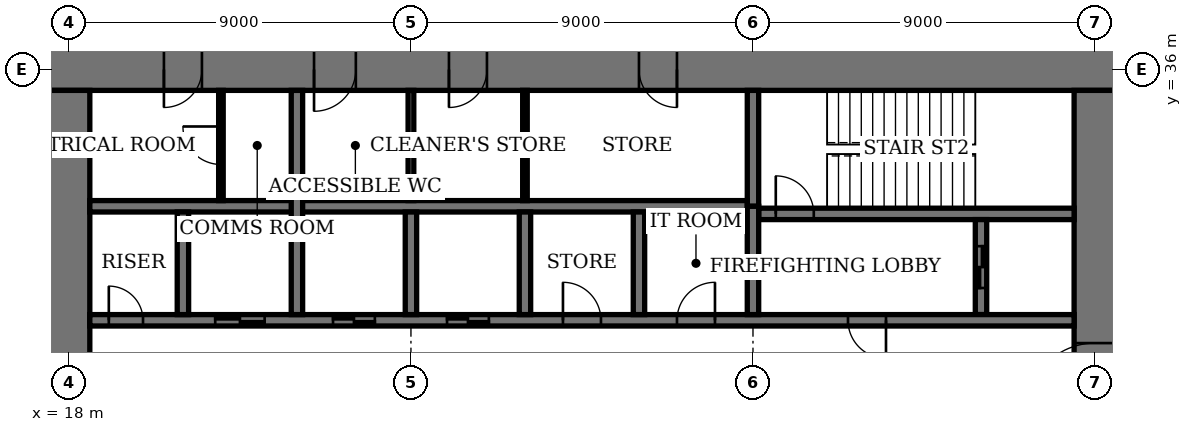
"""IFC4 building model, lengths in metres.
Left out: names, types, materials, properties, quantities, classifications, styles, units other than length and angle.
Written with IfcOpenShell. Run it as: python <this file> out.ifc"""

import sys

from ifc_helpers import new_model, si_unit, direction, frame, frame_2d, origin, place, context, subcontext, project, spatial, rectangle, extrude, element, fill, save


model = new_model("IFC4")
c1 = context("Model", 3, precision=1e-05, world=origin(), true_north=direction((0.0, 1.0)))
c2 = subcontext(c1, "Body", "Model", "MODEL_VIEW")
j1 = project(units=[si_unit("LENGTHUNIT", "METRE"), si_unit("PLANEANGLEUNIT", "RADIAN")], contexts=[c1])
p1 = place(None, origin())
s1 = spatial("IfcSite", under=j1, at=p1, CompositionType="ELEMENT")
p2 = place(p1, origin())
s2 = spatial("IfcBuilding", under=s1, at=p2, CompositionType="ELEMENT")
p3 = place(p2, frame((0.0, 0.0, 210.2)))
s3 = spatial("IfcBuildingStorey", under=s2, at=p3, CompositionType="ELEMENT", Elevation=210.2)
p4 = place(p3, frame((45.55, 36.0, 0.0), z_axis=(0.0, 0.0, 1.0), x_axis=(-1.0, 0.0, 0.0)))
e1 = element("IfcWall", 1, at=p4, inside=s3, PredefinedType="SHEAR", context=c2, shape_type="SweptSolid", body=[
    extrude(rectangle(XDim=28.1, YDim=1.1, at=frame_2d((14.05, 0.0))), origin(), (0.0, 0.0, 1.0), 4.0),
])
p5 = place(p4, frame((11.55, 0.0, 0.0)))
e2 = element("IfcOpeningElement", 2, at=p5, cuts=e1, PredefinedType="OPENING", context=c2, shape_type="SweptSolid", body=[
    extrude(rectangle(XDim=1.0, YDim=2.4, at=frame_2d((0.5, 1.2))), frame((0.0, 0.56, 0.0), z_axis=(0.0, -1.0, 0.0), x_axis=(1.0, 0.0, 0.0)), (0.0, 0.0, 1.0), 1.12),
])
p6 = place(p4, frame((16.55, 0.0, 0.0)))
e3 = element("IfcOpeningElement", 3, at=p6, cuts=e1, PredefinedType="OPENING", context=c2, shape_type="SweptSolid", body=[
    extrude(rectangle(XDim=1.0, YDim=2.4, at=frame_2d((0.5, 1.2))), frame((0.0, 0.56, 0.0), z_axis=(0.0, -1.0, 0.0), x_axis=(1.0, 0.0, 0.0)), (0.0, 0.0, 1.0), 1.12),
])
p7 = place(p4, frame((20.0, 0.0, 0.0)))
e4 = element("IfcOpeningElement", 4, at=p7, cuts=e1, PredefinedType="OPENING", context=c2, shape_type="SweptSolid", body=[
    extrude(rectangle(XDim=1.1, YDim=2.4, at=frame_2d((0.55, 1.2))), frame((0.0, 0.56, 0.0), z_axis=(0.0, -1.0, 0.0), x_axis=(1.0, 0.0, 0.0)), (0.0, 0.0, 1.0), 1.12),
])
p8 = place(p4, frame((24.05, 0.0, 0.0)))
e5 = element("IfcOpeningElement", 5, at=p8, cuts=e1, PredefinedType="OPENING", context=c2, shape_type="SweptSolid", body=[
    extrude(rectangle(XDim=1.0, YDim=2.4, at=frame_2d((0.5, 1.2))), frame((0.0, 0.56, 0.0), z_axis=(0.0, -1.0, 0.0), x_axis=(1.0, 0.0, 0.0)), (0.0, 0.0, 1.0), 1.12),
])
p9 = place(p3, frame((18.0, 35.45, 0.0), z_axis=(0.0, 0.0, 1.0), x_axis=(0.0, -1.0, 0.0)))
e6 = element("IfcWall", 6, at=p9, inside=s3, PredefinedType="SHEAR", context=c2, shape_type="SweptSolid", body=[
    extrude(rectangle(XDim=16.9, YDim=1.1, at=frame_2d((8.45, 0.0))), origin(), (0.0, 0.0, 1.0), 4.0),
])
p10 = place(p9, frame((8.45, 0.0, 0.0)))
e7 = element("IfcOpeningElement", 7, at=p10, cuts=e6, PredefinedType="OPENING", context=c2, shape_type="SweptSolid", body=[
    extrude(rectangle(XDim=1.8, YDim=2.4, at=frame_2d((0.9, 1.2))), frame((0.0, 0.56, 0.0), z_axis=(0.0, -1.0, 0.0), x_axis=(1.0, 0.0, 0.0)), (0.0, 0.0, 1.0), 1.12),
])
p11 = place(p3, frame((45.0, 18.55, 0.0), z_axis=(0.0, 0.0, 1.0), x_axis=(0.0, 1.0, 0.0)))
e8 = element("IfcWall", 8, at=p11, inside=s3, PredefinedType="SHEAR", context=c2, shape_type="SweptSolid", body=[
    extrude(rectangle(XDim=16.9, YDim=1.1, at=frame_2d((8.45, 0.0))), origin(), (0.0, 0.0, 1.0), 4.0),
])
p12 = place(p11, frame((8.45, 0.0, 0.0)))
e9 = element("IfcOpeningElement", 9, at=p12, cuts=e8, PredefinedType="OPENING", context=c2, shape_type="SweptSolid", body=[
    extrude(rectangle(XDim=1.8, YDim=2.4, at=frame_2d((0.9, 1.2))), frame((0.0, 0.56, 0.0), z_axis=(0.0, -1.0, 0.0), x_axis=(1.0, 0.0, 0.0)), (0.0, 0.0, 1.0), 1.12),
])
p13 = place(p3, frame((36.15, 32.2, 0.0), z_axis=(0.0, 0.0, 1.0), x_axis=(1.0, 0.0, 0.0)))
e10 = element("IfcWall", 10, at=p13, inside=s3, PredefinedType="SHEAR", context=c2, shape_type="SweptSolid", body=[
    extrude(rectangle(XDim=8.3, YDim=0.3, at=frame_2d((4.15, 0.0))), origin(), (0.0, 0.0, 1.0), 4.0),
])
p14 = place(p13, frame((0.45, 0.0, 0.0)))
e11 = element("IfcOpeningElement", 11, at=p14, cuts=e10, PredefinedType="OPENING", context=c2, shape_type="SweptSolid", body=[
    extrude(rectangle(XDim=1.0, YDim=2.4, at=frame_2d((0.5, 1.2))), frame((0.0, 0.16, 0.0), z_axis=(0.0, -1.0, 0.0), x_axis=(1.0, 0.0, 0.0)), (0.0, 0.0, 1.0), 0.32),
])
p15 = place(p3, frame((36.0, 32.4, 0.0), z_axis=(0.0, 0.0, 1.0), x_axis=(0.0, 1.0, 0.0)))
e12 = element("IfcWall", 12, at=p15, inside=s3, PredefinedType="SHEAR", context=c2, shape_type="SweptSolid", body=[
    extrude(rectangle(XDim=3.05, YDim=0.3, at=frame_2d((1.525, 0.0))), origin(), (0.0, 0.0, 1.0), 4.0),
])
p16 = place(p3, frame((42.0, 29.55, 0.0), z_axis=(0.0, 0.0, 1.0), x_axis=(0.0, 1.0, 0.0)))
e13 = element("IfcWall", 13, at=p16, inside=s3, PredefinedType="SHEAR", context=c2, shape_type="SweptSolid", body=[
    extrude(rectangle(XDim=2.5, YDim=0.3, at=frame_2d((1.25, 0.0))), origin(), (0.0, 0.0, 1.0), 4.0),
])
p17 = place(p16, frame((0.7, 0.0, 0.0)))
e14 = element("IfcOpeningElement", 14, at=p17, cuts=e13, PredefinedType="OPENING", context=c2, shape_type="SweptSolid", body=[
    extrude(rectangle(XDim=1.1, YDim=2.4, at=frame_2d((0.55, 1.2))), frame((0.0, 0.16, 0.0), z_axis=(0.0, -1.0, 0.0), x_axis=(1.0, 0.0, 0.0)), (0.0, 0.0, 1.0), 0.32),
])
p18 = place(p3, frame((18.55, 29.4, 0.0), z_axis=(0.0, 0.0, 1.0), x_axis=(1.0, 0.0, 0.0)))
e15 = element("IfcWall", 15, at=p18, inside=s3, PredefinedType="SHEAR", context=c2, shape_type="SweptSolid", body=[
    extrude(rectangle(XDim=25.9, YDim=0.3, at=frame_2d((12.95, 0.0))), origin(), (0.0, 0.0, 1.0), 4.0),
])
p19 = place(p18, frame((19.95, 0.0, 0.0)))
e16 = element("IfcOpeningElement", 16, at=p19, cuts=e15, PredefinedType="OPENING", context=c2, shape_type="SweptSolid", body=[
    extrude(rectangle(XDim=1.0, YDim=2.4, at=frame_2d((0.5, 1.2))), frame((0.0, 0.16, 0.0), z_axis=(0.0, -1.0, 0.0), x_axis=(1.0, 0.0, 0.0)), (0.0, 0.0, 1.0), 0.32),
])
p20 = place(p18, frame((0.5, 0.0, 0.0)))
e17 = element("IfcOpeningElement", 17, at=p20, cuts=e15, PredefinedType="OPENING", context=c2, shape_type="SweptSolid", body=[
    extrude(rectangle(XDim=0.9, YDim=2.1, at=frame_2d((0.45, 1.05))), frame((0.0, 0.16, 0.0), z_axis=(0.0, -1.0, 0.0), x_axis=(1.0, 0.0, 0.0)), (0.0, 0.0, 1.0), 0.32),
])
p21 = place(p18, frame((15.45, 0.0, 0.0)))
e18 = element("IfcOpeningElement", 18, at=p21, cuts=e15, PredefinedType="OPENING", context=c2, shape_type="SweptSolid", body=[
    extrude(rectangle(XDim=1.0, YDim=2.4, at=frame_2d((0.5, 1.2))), frame((0.0, 0.16, 0.0), z_axis=(0.0, -1.0, 0.0), x_axis=(1.0, 0.0, 0.0)), (0.0, 0.0, 1.0), 0.32),
])
p22 = place(p18, frame((12.45, 0.0, 0.0)))
e19 = element("IfcOpeningElement", 19, at=p22, cuts=e15, PredefinedType="OPENING", context=c2, shape_type="SweptSolid", body=[
    extrude(rectangle(XDim=1.0, YDim=2.4, at=frame_2d((0.5, 1.2))), frame((0.0, 0.16, 0.0), z_axis=(0.0, -1.0, 0.0), x_axis=(1.0, 0.0, 0.0)), (0.0, 0.0, 1.0), 0.32),
])
p23 = place(p18, frame((9.4, 0.0, 0.0)))
e20 = element("IfcOpeningElement", 20, at=p23, cuts=e15, PredefinedType="OPENING", context=c2, shape_type="SweptSolid", body=[
    extrude(rectangle(XDim=1.1, YDim=2.4, at=frame_2d((0.55, 1.2))), frame((0.0, 0.16, 0.0), z_axis=(0.0, -1.0, 0.0), x_axis=(1.0, 0.0, 0.0)), (0.0, 0.0, 1.0), 0.32),
])
p24 = place(p18, frame((6.4, 0.0, 0.0)))
e21 = element("IfcOpeningElement", 21, at=p24, cuts=e15, PredefinedType="OPENING", context=c2, shape_type="SweptSolid", body=[
    extrude(rectangle(XDim=1.1, YDim=2.4, at=frame_2d((0.55, 1.2))), frame((0.0, 0.16, 0.0), z_axis=(0.0, -1.0, 0.0), x_axis=(1.0, 0.0, 0.0)), (0.0, 0.0, 1.0), 0.32),
])
p25 = place(p18, frame((3.3, 0.0, 0.0)))
e22 = element("IfcOpeningElement", 22, at=p25, cuts=e15, PredefinedType="OPENING", context=c2, shape_type="SweptSolid", body=[
    extrude(rectangle(XDim=1.3, YDim=2.4, at=frame_2d((0.65, 1.2))), frame((0.0, 0.16, 0.0), z_axis=(0.0, -1.0, 0.0), x_axis=(1.0, 0.0, 0.0)), (0.0, 0.0, 1.0), 0.32),
])
p26 = place(p3, frame((18.55, 32.4, 0.0), z_axis=(0.0, 0.0, 1.0), x_axis=(1.0, 0.0, 0.0)))
e23 = element("IfcWall", 23, at=p26, inside=s3, PredefinedType="SHEAR", context=c2, shape_type="SweptSolid", body=[
    extrude(rectangle(XDim=17.3, YDim=0.3, at=frame_2d((8.65, 0.0))), origin(), (0.0, 0.0, 1.0), 4.0),
])
for number, where, z_axis, x_axis in (
    (24, (33.0, 29.55, 0.0), (0.0, 0.0, 1.0), (0.0, 1.0, 0.0)),
    (25, (30.0, 29.55, 0.0), (0.0, 0.0, 1.0), (0.0, 1.0, 0.0)),
    (26, (27.0, 29.55, 0.0), (0.0, 0.0, 1.0), (0.0, 1.0, 0.0)),
):
    element("IfcWall", number, at=place(p3, frame(where, z_axis=z_axis, x_axis=x_axis)), inside=s3, PredefinedType="SHEAR", context=c2, shape_type="SweptSolid", body=[
        extrude(rectangle(XDim=2.7, YDim=0.3, at=frame_2d((1.35, 0.0))), origin(), (0.0, 0.0, 1.0), 4.0),
    ])
p27 = place(p3, frame((24.0, 29.55, 0.0), z_axis=(0.0, 0.0, 1.0), x_axis=(0.0, 1.0, 0.0)))
e27 = element("IfcWall", 27, at=p27, inside=s3, PredefinedType="SHEAR", context=c2, shape_type="SweptSolid", body=[
    extrude(rectangle(XDim=5.9, YDim=0.3, at=frame_2d((2.95, 0.0))), origin(), (0.0, 0.0, 1.0), 4.0),
])
p28 = place(p3, frame((21.0, 29.55, 0.0), z_axis=(0.0, 0.0, 1.0), x_axis=(0.0, 1.0, 0.0)))
e28 = element("IfcWall", 28, at=p28, inside=s3, PredefinedType="SHEAR", context=c2, shape_type="SweptSolid", body=[
    extrude(rectangle(XDim=2.7, YDim=0.3, at=frame_2d((1.35, 0.0))), origin(), (0.0, 0.0, 1.0), 4.0),
])
p29 = place(p3, frame((36.0, 29.55, 0.0), z_axis=(0.0, 0.0, 1.0), x_axis=(0.0, 1.0, 0.0)))
e29 = element("IfcWall", 29, at=p29, inside=s3, PredefinedType="SHEAR", context=c2, shape_type="SweptSolid", body=[
    extrude(rectangle(XDim=2.85, YDim=0.3, at=frame_2d((1.425, 0.0))), origin(), (0.0, 0.0, 1.0), 4.0),
])
p30 = place(p3, frame((30.0, 32.55, 0.0), z_axis=(0.0, 0.0, 1.0), x_axis=(0.0, 1.0, 0.0)))
e30 = element("IfcWall", 30, at=p30, inside=s3, PredefinedType="PARTITIONING", context=c2, shape_type="SweptSolid", body=[
    extrude(rectangle(XDim=2.9, YDim=0.12, at=frame_2d((1.45, 0.0))), origin(), (0.0, 0.0, 1.0), 3.75),
])
p31 = place(p3, frame((27.0, 32.55, 0.0), z_axis=(0.0, 0.0, 1.0), x_axis=(0.0, 1.0, 0.0)))
e31 = element("IfcWall", 31, at=p31, inside=s3, PredefinedType="PARTITIONING", context=c2, shape_type="SweptSolid", body=[
    extrude(rectangle(XDim=2.9, YDim=0.15, at=frame_2d((1.45, 0.0))), origin(), (0.0, 0.0, 1.0), 3.75),
])
p32 = place(p3, frame((22.0, 32.55, 0.0), z_axis=(0.0, 0.0, 1.0), x_axis=(0.0, 1.0, 0.0)))
e32 = element("IfcWall", 32, at=p32, inside=s3, PredefinedType="PARTITIONING", context=c2, shape_type="SweptSolid", body=[
    extrude(rectangle(XDim=2.9, YDim=0.12, at=frame_2d((1.45, 0.0))), origin(), (0.0, 0.0, 1.0), 3.75),
])
p33 = place(p32, frame((0.95, 0.0, 0.0)))
e33 = element("IfcOpeningElement", 33, at=p33, cuts=e32, PredefinedType="OPENING", context=c2, shape_type="SweptSolid", body=[
    extrude(rectangle(XDim=1.0, YDim=2.4, at=frame_2d((0.5, 1.2))), frame((0.0, 0.07, 0.0), z_axis=(0.0, -1.0, 0.0), x_axis=(1.0, 0.0, 0.0)), (0.0, 0.0, 1.0), 0.14),
])
p34 = place(p12, origin())
e34 = element("IfcDoor", 34, at=p34, inside=s3, OperationType="DOUBLE_DOOR_DOUBLE_SWING", PredefinedType="DOOR", context=c2, shape_type="SweptSolid", body=[
    extrude(rectangle(XDim=1.8, YDim=2.4, at=frame_2d((0.9, 1.2))), frame((0.0, 0.03, 0.0), z_axis=(0.0, -1.0, 0.0), x_axis=(1.0, 0.0, 0.0)), (0.0, 0.0, 1.0), 0.06),
    extrude(rectangle(XDim=0.04, YDim=2.4, at=frame_2d((0.02, 1.2))), frame((0.0, 0.55, 0.0), z_axis=(0.0, -1.0, 0.0), x_axis=(1.0, 0.0, 0.0)), (0.0, 0.0, 1.0), 1.1),
    extrude(rectangle(XDim=0.04, YDim=2.4, at=frame_2d((1.78, 1.2))), frame((0.0, 0.55, 0.0), z_axis=(0.0, -1.0, 0.0), x_axis=(1.0, 0.0, 0.0)), (0.0, 0.0, 1.0), 1.1),
    extrude(rectangle(XDim=1.8, YDim=0.04, at=frame_2d((0.9, 2.38))), frame((0.0, 0.55, 0.0), z_axis=(0.0, -1.0, 0.0), x_axis=(1.0, 0.0, 0.0)), (0.0, 0.0, 1.0), 1.1),
])
fill(e9, e34)
p35 = place(p5, origin())
e35 = element("IfcDoor", 35, at=p35, inside=s3, OperationType="SINGLE_SWING_RIGHT", PredefinedType="DOOR", context=c2, shape_type="SweptSolid", body=[
    extrude(rectangle(XDim=1.0, YDim=2.4, at=frame_2d((0.5, 1.2))), frame((0.0, 0.025, 0.0), z_axis=(0.0, -1.0, 0.0), x_axis=(1.0, 0.0, 0.0)), (0.0, 0.0, 1.0), 0.05),
    extrude(rectangle(XDim=0.04, YDim=2.4, at=frame_2d((0.02, 1.2))), frame((0.0, 0.4, 0.0), z_axis=(0.0, -1.0, 0.0), x_axis=(1.0, 0.0, 0.0)), (0.0, 0.0, 1.0), 0.8),
    extrude(rectangle(XDim=0.04, YDim=2.4, at=frame_2d((0.98, 1.2))), frame((0.0, 0.4, 0.0), z_axis=(0.0, -1.0, 0.0), x_axis=(1.0, 0.0, 0.0)), (0.0, 0.0, 1.0), 0.8),
    extrude(rectangle(XDim=1.0, YDim=0.04, at=frame_2d((0.5, 2.38))), frame((0.0, 0.4, 0.0), z_axis=(0.0, -1.0, 0.0), x_axis=(1.0, 0.0, 0.0)), (0.0, 0.0, 1.0), 0.8),
])
fill(e2, e35)
p36 = place(p6, origin())
e36 = element("IfcDoor", 36, at=p36, inside=s3, OperationType="SINGLE_SWING_LEFT", PredefinedType="DOOR", context=c2, shape_type="SweptSolid", body=[
    extrude(rectangle(XDim=1.0, YDim=2.4, at=frame_2d((0.5, 1.2))), frame((0.0, 0.025, 0.0), z_axis=(0.0, -1.0, 0.0), x_axis=(1.0, 0.0, 0.0)), (0.0, 0.0, 1.0), 0.05),
    extrude(rectangle(XDim=0.04, YDim=2.4, at=frame_2d((0.02, 1.2))), frame((0.0, 0.4, 0.0), z_axis=(0.0, -1.0, 0.0), x_axis=(1.0, 0.0, 0.0)), (0.0, 0.0, 1.0), 0.8),
    extrude(rectangle(XDim=0.04, YDim=2.4, at=frame_2d((0.98, 1.2))), frame((0.0, 0.4, 0.0), z_axis=(0.0, -1.0, 0.0), x_axis=(1.0, 0.0, 0.0)), (0.0, 0.0, 1.0), 0.8),
    extrude(rectangle(XDim=1.0, YDim=0.04, at=frame_2d((0.5, 2.38))), frame((0.0, 0.4, 0.0), z_axis=(0.0, -1.0, 0.0), x_axis=(1.0, 0.0, 0.0)), (0.0, 0.0, 1.0), 0.8),
])
fill(e3, e36)
p37 = place(p7, origin())
e37 = element("IfcDoor", 37, at=p37, inside=s3, OperationType="SINGLE_SWING_LEFT", PredefinedType="DOOR", context=c2, shape_type="SweptSolid", body=[
    extrude(rectangle(XDim=1.1, YDim=2.4, at=frame_2d((0.55, 1.2))), frame((0.0, 0.025, 0.0), z_axis=(0.0, -1.0, 0.0), x_axis=(1.0, 0.0, 0.0)), (0.0, 0.0, 1.0), 0.05),
    extrude(rectangle(XDim=0.04, YDim=2.4, at=frame_2d((0.02, 1.2))), frame((0.0, 0.44, 0.0), z_axis=(0.0, -1.0, 0.0), x_axis=(1.0, 0.0, 0.0)), (0.0, 0.0, 1.0), 0.88),
    extrude(rectangle(XDim=0.04, YDim=2.4, at=frame_2d((1.08, 1.2))), frame((0.0, 0.44, 0.0), z_axis=(0.0, -1.0, 0.0), x_axis=(1.0, 0.0, 0.0)), (0.0, 0.0, 1.0), 0.88),
    extrude(rectangle(XDim=1.1, YDim=0.04, at=frame_2d((0.55, 2.38))), frame((0.0, 0.44, 0.0), z_axis=(0.0, -1.0, 0.0), x_axis=(1.0, 0.0, 0.0)), (0.0, 0.0, 1.0), 0.88),
])
fill(e4, e37)
p38 = place(p8, origin())
e38 = element("IfcDoor", 38, at=p38, inside=s3, OperationType="SINGLE_SWING_LEFT", PredefinedType="DOOR", context=c2, shape_type="SweptSolid", body=[
    extrude(rectangle(XDim=1.0, YDim=2.4, at=frame_2d((0.5, 1.2))), frame((0.0, 0.025, 0.0), z_axis=(0.0, -1.0, 0.0), x_axis=(1.0, 0.0, 0.0)), (0.0, 0.0, 1.0), 0.05),
    extrude(rectangle(XDim=0.04, YDim=2.4, at=frame_2d((0.02, 1.2))), frame((0.0, 0.4, 0.0), z_axis=(0.0, -1.0, 0.0), x_axis=(1.0, 0.0, 0.0)), (0.0, 0.0, 1.0), 0.8),
    extrude(rectangle(XDim=0.04, YDim=2.4, at=frame_2d((0.98, 1.2))), frame((0.0, 0.4, 0.0), z_axis=(0.0, -1.0, 0.0), x_axis=(1.0, 0.0, 0.0)), (0.0, 0.0, 1.0), 0.8),
    extrude(rectangle(XDim=1.0, YDim=0.04, at=frame_2d((0.5, 2.38))), frame((0.0, 0.4, 0.0), z_axis=(0.0, -1.0, 0.0), x_axis=(1.0, 0.0, 0.0)), (0.0, 0.0, 1.0), 0.8),
])
fill(e5, e38)
p39 = place(p14, origin())
e39 = element("IfcDoor", 39, at=p39, inside=s3, OperationType="SINGLE_SWING_RIGHT", PredefinedType="DOOR", context=c2, shape_type="SweptSolid", body=[
    extrude(rectangle(XDim=1.0, YDim=2.4, at=frame_2d((0.5, 1.2))), frame((0.0, 0.03, 0.0), z_axis=(0.0, -1.0, 0.0), x_axis=(1.0, 0.0, 0.0)), (0.0, 0.0, 1.0), 0.06),
])
fill(e11, e39)
p40 = place(p19, origin())
e40 = element("IfcDoor", 40, at=p40, inside=s3, OperationType="SINGLE_SWING_RIGHT", PredefinedType="DOOR", context=c2, shape_type="SweptSolid", body=[
    extrude(rectangle(XDim=1.0, YDim=2.4, at=frame_2d((0.5, 1.2))), frame((0.0, 0.03, 0.0), z_axis=(0.0, -1.0, 0.0), x_axis=(1.0, 0.0, 0.0)), (0.0, 0.0, 1.0), 0.06),
])
fill(e16, e40)
p41 = place(p20, origin())
e41 = element("IfcDoor", 41, at=p41, inside=s3, OperationType="SINGLE_SWING_RIGHT", PredefinedType="DOOR", context=c2, shape_type="SweptSolid", body=[
    extrude(rectangle(XDim=0.9, YDim=2.1, at=frame_2d((0.45, 1.05))), frame((0.0, 0.03, 0.0), z_axis=(0.0, -1.0, 0.0), x_axis=(1.0, 0.0, 0.0)), (0.0, 0.0, 1.0), 0.06),
])
fill(e17, e41)
p42 = place(p33, origin())
e42 = element("IfcDoor", 42, at=p42, inside=s3, OperationType="SINGLE_SWING_LEFT", PredefinedType="DOOR", context=c2, shape_type="SweptSolid", body=[
    extrude(rectangle(XDim=1.0, YDim=2.4, at=frame_2d((0.5, 1.2))), frame((0.0, 0.03, 0.0), z_axis=(0.0, -1.0, 0.0), x_axis=(1.0, 0.0, 0.0)), (0.0, 0.0, 1.0), 0.06),
])
fill(e33, e42)
p43 = place(p21, origin())
e43 = element("IfcDoor", 43, at=p43, inside=s3, OperationType="SINGLE_SWING_LEFT", PredefinedType="DOOR", context=c2, shape_type="SweptSolid", body=[
    extrude(rectangle(XDim=1.0, YDim=2.4, at=frame_2d((0.5, 1.2))), frame((0.0, 0.03, 0.0), z_axis=(0.0, -1.0, 0.0), x_axis=(1.0, 0.0, 0.0)), (0.0, 0.0, 1.0), 0.06),
])
fill(e18, e43)
p44 = place(p22, origin())
e44 = element("IfcDoor", 44, at=p44, inside=s3, OperationType="SINGLE_SWING_RIGHT", PredefinedType="DOOR", context=c2, shape_type="SweptSolid", body=[
    extrude(rectangle(XDim=1.0, YDim=2.4, at=frame_2d((0.5, 1.2))), frame((0.0, 0.03, 0.0), z_axis=(0.0, -1.0, 0.0), x_axis=(1.0, 0.0, 0.0)), (0.0, 0.0, 1.0), 0.06),
])
fill(e19, e44)
p45 = place(p23, origin())
e45 = element("IfcDoor", 45, at=p45, inside=s3, OperationType="DOUBLE_DOOR_SLIDING", PredefinedType="DOOR", context=c2, shape_type="SweptSolid", body=[
    extrude(rectangle(XDim=1.1, YDim=2.4, at=frame_2d((0.55, 1.2))), frame((0.0, 0.02, 0.0), z_axis=(0.0, -1.0, 0.0), x_axis=(1.0, 0.0, 0.0)), (0.0, 0.0, 1.0), 0.04),
])
fill(e20, e45)
p46 = place(p24, origin())
e46 = element("IfcDoor", 46, at=p46, inside=s3, OperationType="DOUBLE_DOOR_SLIDING", PredefinedType="DOOR", context=c2, shape_type="SweptSolid", body=[
    extrude(rectangle(XDim=1.1, YDim=2.4, at=frame_2d((0.55, 1.2))), frame((0.0, 0.02, 0.0), z_axis=(0.0, -1.0, 0.0), x_axis=(1.0, 0.0, 0.0)), (0.0, 0.0, 1.0), 0.04),
])
fill(e21, e46)
p47 = place(p25, origin())
e47 = element("IfcDoor", 47, at=p47, inside=s3, OperationType="DOUBLE_DOOR_SLIDING", PredefinedType="DOOR", context=c2, shape_type="SweptSolid", body=[
    extrude(rectangle(XDim=1.3, YDim=2.4, at=frame_2d((0.65, 1.2))), frame((0.0, 0.02, 0.0), z_axis=(0.0, -1.0, 0.0), x_axis=(1.0, 0.0, 0.0)), (0.0, 0.0, 1.0), 0.04),
])
fill(e22, e47)
p48 = place(p17, origin())
e48 = element("IfcDoor", 48, at=p48, inside=s3, OperationType="DOUBLE_DOOR_SLIDING", PredefinedType="DOOR", context=c2, shape_type="SweptSolid", body=[
    extrude(rectangle(XDim=1.1, YDim=2.4, at=frame_2d((0.55, 1.2))), frame((0.0, 0.03, 0.0), z_axis=(0.0, -1.0, 0.0), x_axis=(1.0, 0.0, 0.0)), (0.0, 0.0, 1.0), 0.06),
])
fill(e14, e48)
save(model, sys.argv[1])
